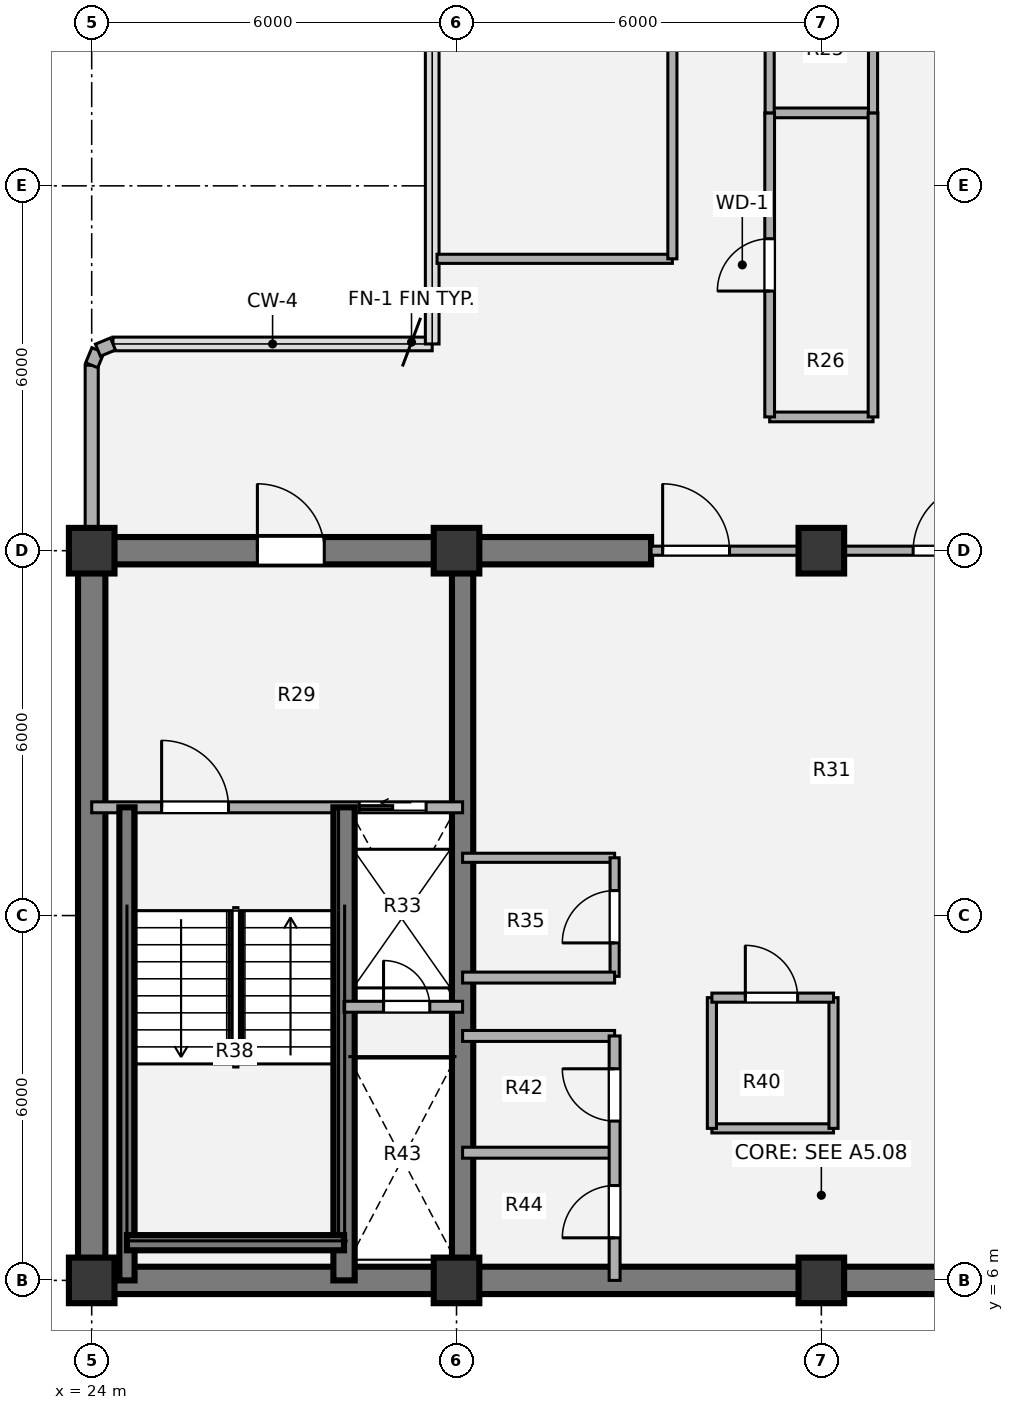
"""IFC4 building model, lengths in metres.
Left out: names, types, materials, properties, quantities, classifications, styles, units other than length and angle.
Written with IfcOpenShell. Run it as: python <this file> out.ifc"""

import sys

from ifc_helpers import new_model, si_unit, direction, frame, frame_2d, origin, origin_2d, place, context, subcontext, project, spatial, rectangle, extrude, source, transform, mapped, element, fill, save


model = new_model("IFC4")
c1 = context("Model", 3, precision=1e-05, world=origin(), true_north=direction((0.0, 1.0)))
c2 = subcontext(c1, "Body", "Model", "MODEL_VIEW")
j1 = project(units=[si_unit("LENGTHUNIT", "METRE"), si_unit("PLANEANGLEUNIT", "RADIAN")], contexts=[c1])
p1 = place(None, origin())
s1 = spatial("IfcSite", under=j1, at=p1, CompositionType="ELEMENT")
p2 = place(p1, origin())
s2 = spatial("IfcBuilding", under=s1, at=p2, CompositionType="ELEMENT")
p3 = place(p2, frame((0.0, 0.0, 167.76)))
s3 = spatial("IfcBuildingStorey", under=s2, at=p3, CompositionType="ELEMENT", Elevation=167.76)
m1 = source(origin(), c2, "Body", "SweptSolid", [
    extrude(rectangle(XDim=0.75, YDim=0.75, at=origin_2d()), origin(), (0.0, 0.0, 1.0), 3.78),
])
for number, where, z_axis, x_axis in (
    (1, (24.0, 6.0, 0.0), (0.0, 0.0, 1.0), (1.0, 0.0, 0.0)),
    (2, (30.0, 6.0, 0.0), (0.0, 0.0, 1.0), (1.0, 0.0, 0.0)),
    (3, (36.0, 6.0, 0.0), (0.0, 0.0, 1.0), (1.0, 0.0, 0.0)),
    (4, (24.0, 18.0, 0.0), (0.0, 0.0, 1.0), (1.0, 0.0, 0.0)),
    (5, (30.0, 18.0, 0.0), (0.0, 0.0, 1.0), (1.0, 0.0, 0.0)),
    (6, (36.0, 18.0, 0.0), (0.0, 0.0, 1.0), (1.0, 0.0, 0.0)),
):
    element("IfcColumn", number, at=place(p3, frame(where, z_axis=z_axis, x_axis=x_axis)), inside=s3, PredefinedType="COLUMN", context=c2, shape_type="MappedRepresentation", body=[
        mapped(m1, transform((0.0, 0.0, 0.0), x_axis=(1.0, 0.0, 0.0), y_axis=(0.0, 1.0, 0.0), z_axis=(0.0, 0.0, 1.0), scale=1.0)),
    ])
p4 = place(p3, frame((48.225, 6.0, 0.0), z_axis=(0.0, 0.0, 1.0), x_axis=(-1.0, 0.0, 0.0)))
e7 = element("IfcWall", 7, at=p4, inside=s3, PredefinedType="SHEAR", context=c2, shape_type="SweptSolid", body=[
    extrude(rectangle(XDim=24.45, YDim=0.45, at=frame_2d((12.225, 0.0))), origin(), (0.0, 0.0, 1.0), 3.78),
])
p5 = place(p3, frame((24.0, 6.0, 0.0), z_axis=(0.0, 0.0, 1.0), x_axis=(0.0, 1.0, 0.0)))
e8 = element("IfcWall", 8, at=p5, inside=s3, PredefinedType="SHEAR", context=c2, shape_type="SweptSolid", body=[
    extrude(rectangle(XDim=12.0, YDim=0.45, at=frame_2d((6.0, 0.0))), origin(), (0.0, 0.0, 1.0), 3.78),
])
p6 = place(p3, frame((23.775, 18.0, 0.0), z_axis=(0.0, 0.0, 1.0), x_axis=(1.0, 0.0, 0.0)))
e9 = element("IfcWall", 9, at=p6, inside=s3, PredefinedType="SHEAR", context=c2, shape_type="SweptSolid", body=[
    extrude(rectangle(XDim=9.425, YDim=0.45, at=frame_2d((4.712, 0.0))), origin(), (0.0, 0.0, 1.0), 3.78),
])
p7 = place(p6, frame((2.95, 0.0, 0.0)))
e10 = element("IfcOpeningElement", 10, at=p7, cuts=e9, PredefinedType="OPENING", context=c2, shape_type="SweptSolid", body=[
    extrude(rectangle(XDim=1.1, YDim=2.1, at=origin_2d()), frame((0.55, 0.235, 1.05), z_axis=(0.0, -1.0, 0.0), x_axis=(1.0, 0.0, 0.0)), (0.0, 0.0, 1.0), 0.47),
])
p8 = place(p3, frame((30.1, 6.0, 0.0), z_axis=(0.0, 0.0, 1.0), x_axis=(0.0, 1.0, 0.0)))
e11 = element("IfcWall", 11, at=p8, inside=s3, PredefinedType="SHEAR", context=c2, shape_type="SweptSolid", body=[
    extrude(rectangle(XDim=12.0, YDim=0.35, at=frame_2d((6.0, 0.0))), origin(), (0.0, 0.0, 1.0), 3.78),
])
p9 = place(p3, frame((24.0, 18.355, 0.0), z_axis=(0.0, 0.0, 1.0), x_axis=(0.0, 1.0, 0.0)))
e12 = element("IfcWall", 12, at=p9, inside=s3, PredefinedType="SOLIDWALL", context=c2, shape_type="SweptSolid", body=[
    extrude(rectangle(XDim=2.695, YDim=0.215, at=frame_2d((1.348, 0.0))), origin(), (0.0, 0.0, 1.0), 2.718),
])
p10 = place(p3, frame((24.0, 21.05, 0.0), z_axis=(0.0, 0.0, 1.0), x_axis=(0.382673670509, 0.923883575944, 0.0)))
e13 = element("IfcWall", 13, at=p10, inside=s3, PredefinedType="SOLIDWALL", context=c2, shape_type="SweptSolid", body=[
    extrude(rectangle(XDim=0.268, YDim=0.215, at=frame_2d((0.134, 0.0))), origin(), (0.0, 0.0, 1.0), 3.53),
])
p11 = place(p3, frame((24.103, 21.298, 0.0), z_axis=(0.0, 0.0, 1.0), x_axis=(0.924205486139, 0.381895560841, 0.0)))
e14 = element("IfcWall", 14, at=p11, inside=s3, PredefinedType="SOLIDWALL", context=c2, shape_type="SweptSolid", body=[
    extrude(rectangle(XDim=0.268, YDim=0.215, at=frame_2d((0.134, 0.0))), origin(), (0.0, 0.0, 1.0), 3.53),
])
p12 = place(p3, frame((30.1, 12.95, 0.0), z_axis=(0.0, 0.0, 1.0), x_axis=(1.0, 0.0, 0.0)))
e15 = element("IfcWall", 15, at=p12, inside=s3, PredefinedType="PARTITIONING", context=c2, shape_type="SweptSolid", body=[
    extrude(rectangle(XDim=2.5, YDim=0.15, at=frame_2d((1.25, 0.0))), origin(), (0.0, 0.0, 1.0), 3.5),
])
p13 = place(p3, frame((32.6, 11.0, 0.0), z_axis=(0.0, 0.0, 1.0), x_axis=(0.0, 1.0, 0.0)))
e16 = element("IfcWall", 16, at=p13, inside=s3, PredefinedType="PARTITIONING", context=c2, shape_type="SweptSolid", body=[
    extrude(rectangle(XDim=1.95, YDim=0.15, at=frame_2d((0.975, 0.0))), origin(), (0.0, 0.0, 1.0), 3.5),
])
p14 = place(p13, frame((0.55, 0.0, 0.0)))
e17 = element("IfcOpeningElement", 17, at=p14, cuts=e16, PredefinedType="OPENING", context=c2, shape_type="SweptSolid", body=[
    extrude(rectangle(XDim=0.86, YDim=2.1, at=origin_2d()), frame((0.43, 0.085, 1.05), z_axis=(0.0, -1.0, 0.0), x_axis=(1.0, 0.0, 0.0)), (0.0, 0.0, 1.0), 0.17),
])
p15 = place(p3, frame((34.2, 8.5, 0.0), z_axis=(0.0, 0.0, 1.0), x_axis=(1.0, 0.0, 0.0)))
e18 = element("IfcWall", 18, at=p15, inside=s3, PredefinedType="PARTITIONING", context=c2, shape_type="SweptSolid", body=[
    extrude(rectangle(XDim=2.0, YDim=0.15, at=frame_2d((1.0, 0.0))), origin(), (0.0, 0.0, 1.0), 3.5),
])
p16 = place(p3, frame((34.2, 8.5, 0.0), z_axis=(0.0, 0.0, 1.0), x_axis=(0.0, 1.0, 0.0)))
e19 = element("IfcWall", 19, at=p16, inside=s3, PredefinedType="PARTITIONING", context=c2, shape_type="SweptSolid", body=[
    extrude(rectangle(XDim=2.15, YDim=0.15, at=frame_2d((1.075, 0.0))), origin(), (0.0, 0.0, 1.0), 3.5),
])
p17 = place(p3, frame((36.2, 8.5, 0.0), z_axis=(0.0, 0.0, 1.0), x_axis=(0.0, 1.0, 0.0)))
e20 = element("IfcWall", 20, at=p17, inside=s3, PredefinedType="PARTITIONING", context=c2, shape_type="SweptSolid", body=[
    extrude(rectangle(XDim=2.15, YDim=0.15, at=frame_2d((1.075, 0.0))), origin(), (0.0, 0.0, 1.0), 2.715),
])
p18 = place(p3, frame((34.2, 10.65, 0.0), z_axis=(0.0, 0.0, 1.0), x_axis=(1.0, 0.0, 0.0)))
e21 = element("IfcWall", 21, at=p18, inside=s3, PredefinedType="PARTITIONING", context=c2, shape_type="SweptSolid", body=[
    extrude(rectangle(XDim=2.0, YDim=0.15, at=frame_2d((1.0, 0.0))), origin(), (0.0, 0.0, 1.0), 3.5),
])
p19 = place(p18, frame((0.55, 0.0, 0.0)))
e22 = element("IfcOpeningElement", 22, at=p19, cuts=e21, PredefinedType="OPENING", context=c2, shape_type="SweptSolid", body=[
    extrude(rectangle(XDim=0.86, YDim=2.1, at=origin_2d()), frame((0.43, 0.085, 1.05), z_axis=(0.0, -1.0, 0.0), x_axis=(1.0, 0.0, 0.0)), (0.0, 0.0, 1.0), 0.17),
])
for number, where, z_axis, x_axis in (
    (23, (30.1, 10.98, 0.0), (0.0, 0.0, 1.0), (1.0, 0.0, 0.0)),
    (24, (30.1, 8.1, 0.0), (0.0, 0.0, 1.0), (1.0, 0.0, 0.0)),
    (25, (30.1, 10.02, 0.0), (0.0, 0.0, 1.0), (1.0, 0.0, 0.0)),
):
    element("IfcWall", number, at=place(p3, frame(where, z_axis=z_axis, x_axis=x_axis)), inside=s3, PredefinedType="PARTITIONING", context=c2, shape_type="SweptSolid", body=[
        extrude(rectangle(XDim=2.5, YDim=0.18, at=frame_2d((1.25, 0.0))), origin(), (0.0, 0.0, 1.0), 3.5),
    ])
p20 = place(p3, frame((32.6, 6.0, 0.0), z_axis=(0.0, 0.0, 1.0), x_axis=(0.0, 1.0, 0.0)))
e26 = element("IfcWall", 26, at=p20, inside=s3, PredefinedType="PARTITIONING", context=c2, shape_type="SweptSolid", body=[
    extrude(rectangle(XDim=4.02, YDim=0.18, at=frame_2d((2.01, 0.0))), origin(), (0.0, 0.0, 1.0), 3.5),
])
p21 = place(p20, frame((0.7, 0.0, 0.0)))
e27 = element("IfcOpeningElement", 27, at=p21, cuts=e26, PredefinedType="OPENING", context=c2, shape_type="SweptSolid", body=[
    extrude(rectangle(XDim=0.86, YDim=2.1, at=origin_2d()), frame((0.43, 0.1, 1.05), z_axis=(0.0, -1.0, 0.0), x_axis=(1.0, 0.0, 0.0)), (0.0, 0.0, 1.0), 0.2),
])
p22 = place(p20, frame((2.62, 0.0, 0.0)))
e28 = element("IfcOpeningElement", 28, at=p22, cuts=e26, PredefinedType="OPENING", context=c2, shape_type="SweptSolid", body=[
    extrude(rectangle(XDim=0.86, YDim=2.1, at=origin_2d()), frame((0.43, 0.1, 1.05), z_axis=(0.0, -1.0, 0.0), x_axis=(1.0, 0.0, 0.0)), (0.0, 0.0, 1.0), 0.2),
])
p23 = place(p3, frame((33.2, 18.0, 0.0), z_axis=(0.0, 0.0, 1.0), x_axis=(1.0, 0.0, 0.0)))
e29 = element("IfcWall", 29, at=p23, inside=s3, PredefinedType="PARTITIONING", context=c2, shape_type="SweptSolid", body=[
    extrude(rectangle(XDim=5.6, YDim=0.15, at=frame_2d((2.8, 0.0))), origin(), (0.0, 0.0, 1.0), 2.515),
])
p24 = place(p23, frame((0.19, 0.0, 0.0)))
e30 = element("IfcOpeningElement", 30, at=p24, cuts=e29, PredefinedType="OPENING", context=c2, shape_type="SweptSolid", body=[
    extrude(rectangle(XDim=1.1, YDim=2.1, at=origin_2d()), frame((0.55, 0.085, 1.05), z_axis=(0.0, -1.0, 0.0), x_axis=(1.0, 0.0, 0.0)), (0.0, 0.0, 1.0), 0.17),
])
p25 = place(p23, frame((4.31, 0.0, 0.0)))
e31 = element("IfcOpeningElement", 31, at=p25, cuts=e29, PredefinedType="OPENING", context=c2, shape_type="SweptSolid", body=[
    extrude(rectangle(XDim=1.1, YDim=2.1, at=origin_2d()), frame((0.55, 0.085, 1.05), z_axis=(0.0, -1.0, 0.0), x_axis=(1.0, 0.0, 0.0)), (0.0, 0.0, 1.0), 0.17),
])
p26 = place(p3, frame((24.0, 13.78, 0.0), z_axis=(0.0, 0.0, 1.0), x_axis=(1.0, 0.0, 0.0)))
e32 = element("IfcWall", 32, at=p26, inside=s3, PredefinedType="PARTITIONING", context=c2, shape_type="SweptSolid", body=[
    extrude(rectangle(XDim=6.1, YDim=0.18, at=frame_2d((3.05, 0.0))), origin(), (0.0, 0.0, 1.0), 3.5),
])
p27 = place(p26, frame((1.15, 0.0, 0.0)))
e33 = element("IfcOpeningElement", 33, at=p27, cuts=e32, PredefinedType="OPENING", context=c2, shape_type="SweptSolid", body=[
    extrude(rectangle(XDim=1.1, YDim=2.1, at=origin_2d()), frame((0.55, 0.1, 1.05), z_axis=(0.0, -1.0, 0.0), x_axis=(1.0, 0.0, 0.0)), (0.0, 0.0, 1.0), 0.2),
])
p28 = place(p26, frame((4.4, 0.0, 0.0)))
e34 = element("IfcOpeningElement", 34, at=p28, cuts=e32, PredefinedType="OPENING", context=c2, shape_type="SweptSolid", body=[
    extrude(rectangle(XDim=1.1, YDim=2.1, at=origin_2d()), frame((0.55, 0.1, 1.05), z_axis=(0.0, -1.0, 0.0), x_axis=(1.0, 0.0, 0.0)), (0.0, 0.0, 1.0), 0.2),
])
p29 = place(p3, frame((28.15, 6.0, 0.0), z_axis=(0.0, 0.0, 1.0), x_axis=(0.0, 1.0, 0.0)))
e35 = element("IfcWall", 35, at=p29, inside=s3, PredefinedType="SHEAR", context=c2, shape_type="SweptSolid", body=[
    extrude(rectangle(XDim=7.78, YDim=0.35, at=frame_2d((3.89, 0.0))), origin(), (0.0, 0.0, 1.0), 3.85),
])
p30 = place(p3, frame((24.58, 6.0, 0.0), z_axis=(0.0, 0.0, 1.0), x_axis=(0.0, 1.0, 0.0)))
e36 = element("IfcWall", 36, at=p30, inside=s3, PredefinedType="SHEAR", context=c2, shape_type="SweptSolid", body=[
    extrude(rectangle(XDim=7.78, YDim=0.25, at=frame_2d((3.89, 0.0))), origin(), (0.0, 0.0, 1.0), 3.85),
])
p31 = place(p3, frame((24.58, 6.62, 0.0), z_axis=(0.0, 0.0, 1.0), x_axis=(1.0, 0.0, 0.0)))
e37 = element("IfcWall", 37, at=p31, inside=s3, PredefinedType="SHEAR", context=c2, shape_type="SweptSolid", body=[
    extrude(rectangle(XDim=3.57, YDim=0.25, at=frame_2d((1.785, 0.0))), origin(), (0.0, 0.0, 1.0), 3.85),
])
p32 = place(p3, frame((28.15, 10.5, 0.0), z_axis=(0.0, 0.0, 1.0), x_axis=(1.0, 0.0, 0.0)))
e38 = element("IfcWall", 38, at=p32, inside=s3, PredefinedType="PARTITIONING", context=c2, shape_type="SweptSolid", body=[
    extrude(rectangle(XDim=1.95, YDim=0.18, at=frame_2d((0.975, 0.0))), origin(), (0.0, 0.0, 1.0), 3.5),
])
p33 = place(p32, frame((0.65, 0.0, 0.0)))
e39 = element("IfcOpeningElement", 39, at=p33, cuts=e38, PredefinedType="OPENING", context=c2, shape_type="SweptSolid", body=[
    extrude(rectangle(XDim=0.76, YDim=2.05, at=origin_2d()), frame((0.38, 0.1, 1.025), z_axis=(0.0, -1.0, 0.0), x_axis=(1.0, 0.0, 0.0)), (0.0, 0.0, 1.0), 0.2),
])
p34 = place(p3, frame((35.15, 20.2, 0.0), z_axis=(0.0, 0.0, 1.0), x_axis=(1.0, 0.0, 0.0)))
e40 = element("IfcWall", 40, at=p34, inside=s3, PredefinedType="PLUMBINGWALL", context=c2, shape_type="SweptSolid", body=[
    extrude(rectangle(XDim=1.7, YDim=0.16, at=frame_2d((0.85, 0.0))), origin(), (0.0, 0.0, 1.0), 3.5),
])
p35 = place(p3, frame((29.68, 22.8, 0.0), z_axis=(0.0, 0.0, 1.0), x_axis=(1.0, 0.0, 0.0)))
e41 = element("IfcWall", 41, at=p35, inside=s3, PredefinedType="PARTITIONING", context=c2, shape_type="SweptSolid", body=[
    extrude(rectangle(XDim=3.87, YDim=0.15, at=frame_2d((1.935, 0.0))), origin(), (0.0, 0.0, 1.0), 3.5),
])
p36 = place(p3, frame((35.15, 25.2, 0.0), z_axis=(0.0, 0.0, 1.0), x_axis=(1.0, 0.0, 0.0)))
e42 = element("IfcWall", 42, at=p36, inside=s3, PredefinedType="PLUMBINGWALL", context=c2, shape_type="SweptSolid", body=[
    extrude(rectangle(XDim=1.7, YDim=0.16, at=frame_2d((0.85, 0.0))), origin(), (0.0, 0.0, 1.0), 3.5),
])
p37 = place(p3, frame((33.55, 22.8, 0.0), z_axis=(0.0, 0.0, 1.0), x_axis=(0.0, 1.0, 0.0)))
e43 = element("IfcWall", 43, at=p37, inside=s3, PredefinedType="PARTITIONING", context=c2, shape_type="SweptSolid", body=[
    extrude(rectangle(XDim=9.8, YDim=0.15, at=frame_2d((4.9, 0.0))), origin(), (0.0, 0.0, 1.0), 3.5),
])
p38 = place(p37, frame((4.34, 0.0, 0.0)))
e44 = element("IfcOpeningElement", 44, at=p38, cuts=e43, PredefinedType="OPENING", context=c2, shape_type="SweptSolid", body=[
    extrude(rectangle(XDim=0.86, YDim=2.1, at=origin_2d()), frame((0.43, 0.085, 1.05), z_axis=(0.0, -1.0, 0.0), x_axis=(1.0, 0.0, 0.0)), (0.0, 0.0, 1.0), 0.17),
])
p39 = place(p3, frame((35.15, 20.2, 0.0), z_axis=(0.0, 0.0, 1.0), x_axis=(0.0, 1.0, 0.0)))
e45 = element("IfcWall", 45, at=p39, inside=s3, PredefinedType="PLUMBINGWALL", context=c2, shape_type="SweptSolid", body=[
    extrude(rectangle(XDim=5.0, YDim=0.16, at=frame_2d((2.5, 0.0))), origin(), (0.0, 0.0, 1.0), 3.5),
])
p40 = place(p39, frame((2.07, 0.0, 0.0)))
e46 = element("IfcOpeningElement", 46, at=p40, cuts=e45, PredefinedType="OPENING", context=c2, shape_type="SweptSolid", body=[
    extrude(rectangle(XDim=0.86, YDim=2.1, at=origin_2d()), frame((0.43, 0.09, 1.05), z_axis=(0.0, -1.0, 0.0), x_axis=(1.0, 0.0, 0.0)), (0.0, 0.0, 1.0), 0.18),
])
p41 = place(p3, frame((35.15, 25.2, 0.0), z_axis=(0.0, 0.0, 1.0), x_axis=(0.0, 1.0, 0.0)))
e47 = element("IfcWall", 47, at=p41, inside=s3, PredefinedType="PARTITIONING", context=c2, shape_type="SweptSolid", body=[
    extrude(rectangle(XDim=15.46, YDim=0.15, at=frame_2d((7.73, 0.0))), origin(), (0.0, 0.0, 1.0), 3.5),
])
p42 = place(p3, frame((36.85, 20.2, 0.0), z_axis=(0.0, 0.0, 1.0), x_axis=(0.0, 1.0, 0.0)))
e48 = element("IfcWall", 48, at=p42, inside=s3, PredefinedType="PLUMBINGWALL", context=c2, shape_type="SweptSolid", body=[
    extrude(rectangle(XDim=5.0, YDim=0.16, at=frame_2d((2.5, 0.0))), origin(), (0.0, 0.0, 1.0), 3.5),
])
p43 = place(p3, frame((36.85, 25.2, 0.0), z_axis=(0.0, 0.0, 1.0), x_axis=(0.0, 1.0, 0.0)))
e49 = element("IfcWall", 49, at=p43, inside=s3, PredefinedType="PARTITIONING", context=c2, shape_type="SweptSolid", body=[
    extrude(rectangle(XDim=15.46, YDim=0.15, at=frame_2d((7.73, 0.0))), origin(), (0.0, 0.0, 1.0), 3.5),
])
p44 = place(p43, frame((7.205, 0.0, 0.0)))
e50 = element("IfcOpeningElement", 50, at=p44, cuts=e49, PredefinedType="OPENING", context=c2, shape_type="SweptSolid", body=[
    extrude(rectangle(XDim=1.05, YDim=2.1, at=origin_2d()), frame((0.525, 0.085, 1.05), z_axis=(0.0, -1.0, 0.0), x_axis=(1.0, 0.0, 0.0)), (0.0, 0.0, 1.0), 0.17),
])
m2 = source(origin(), c2, "Body", "SweptSolid", [
    extrude(rectangle(XDim=0.86, YDim=2.1, at=origin_2d()), frame((0.43, 0.025, 1.05), z_axis=(0.0, -1.0, 0.0), x_axis=(1.0, 0.0, 0.0)), (0.0, 0.0, 1.0), 0.05),
])
p45 = place(p14, origin())
e51 = element("IfcDoor", 51, at=p45, inside=s3, OperationType="SINGLE_SWING_LEFT", PredefinedType="DOOR", context=c2, shape_type="MappedRepresentation", body=[
    mapped(m2, transform((0.0, 0.0, 0.0), x_axis=(1.0, 0.0, 0.0), y_axis=(0.0, 1.0, 0.0), z_axis=(0.0, 0.0, 1.0), scale=1.0)),
])
fill(e17, e51)
p46 = place(p19, origin())
e52 = element("IfcDoor", 52, at=p46, inside=s3, OperationType="SINGLE_SWING_LEFT", PredefinedType="DOOR", context=c2, shape_type="MappedRepresentation", body=[
    mapped(m2, transform((0.0, 0.0, 0.0), x_axis=(1.0, 0.0, 0.0), y_axis=(0.0, 1.0, 0.0), z_axis=(0.0, 0.0, 1.0), scale=1.0)),
])
fill(e22, e52)
p47 = place(p21, origin())
e53 = element("IfcDoor", 53, at=p47, inside=s3, OperationType="SINGLE_SWING_LEFT", PredefinedType="DOOR", context=c2, shape_type="MappedRepresentation", body=[
    mapped(m2, transform((0.0, 0.0, 0.0), x_axis=(1.0, 0.0, 0.0), y_axis=(0.0, 1.0, 0.0), z_axis=(0.0, 0.0, 1.0), scale=1.0)),
])
fill(e27, e53)
p48 = place(p22, origin())
e54 = element("IfcDoor", 54, at=p48, inside=s3, OperationType="SINGLE_SWING_RIGHT", PredefinedType="DOOR", context=c2, shape_type="MappedRepresentation", body=[
    mapped(m2, transform((0.0, 0.0, 0.0), x_axis=(1.0, 0.0, 0.0), y_axis=(0.0, 1.0, 0.0), z_axis=(0.0, 0.0, 1.0), scale=1.0)),
])
fill(e28, e54)
m3 = source(origin(), c2, "Body", "SweptSolid", [
    extrude(rectangle(XDim=1.1, YDim=2.1, at=origin_2d()), frame((0.55, 0.025, 1.05), z_axis=(0.0, -1.0, 0.0), x_axis=(1.0, 0.0, 0.0)), (0.0, 0.0, 1.0), 0.05),
])
p49 = place(p24, origin())
e55 = element("IfcDoor", 55, at=p49, inside=s3, OperationType="SINGLE_SWING_LEFT", PredefinedType="DOOR", context=c2, shape_type="MappedRepresentation", body=[
    mapped(m3, transform((0.0, 0.0, 0.0), x_axis=(1.0, 0.0, 0.0), y_axis=(0.0, 1.0, 0.0), z_axis=(0.0, 0.0, 1.0), scale=1.0)),
])
fill(e30, e55)
p50 = place(p25, origin())
e56 = element("IfcDoor", 56, at=p50, inside=s3, OperationType="SINGLE_SWING_RIGHT", PredefinedType="DOOR", context=c2, shape_type="MappedRepresentation", body=[
    mapped(m3, transform((0.0, 0.0, 0.0), x_axis=(1.0, 0.0, 0.0), y_axis=(0.0, 1.0, 0.0), z_axis=(0.0, 0.0, 1.0), scale=1.0)),
])
fill(e31, e56)
m4 = source(origin(), c2, "Body", "SweptSolid", [
    extrude(rectangle(XDim=1.1, YDim=2.1, at=origin_2d()), frame((0.55, 0.025, 1.05), z_axis=(0.0, -1.0, 0.0), x_axis=(1.0, 0.0, 0.0)), (0.0, 0.0, 1.0), 0.05),
])
p51 = place(p27, origin())
e57 = element("IfcDoor", 57, at=p51, inside=s3, OperationType="SINGLE_SWING_LEFT", PredefinedType="DOOR", context=c2, shape_type="MappedRepresentation", body=[
    mapped(m4, transform((0.0, 0.0, 0.0), x_axis=(1.0, 0.0, 0.0), y_axis=(0.0, 1.0, 0.0), z_axis=(0.0, 0.0, 1.0), scale=1.0)),
])
fill(e33, e57)
m5 = source(origin(), c2, "Body", "SweptSolid", [
    extrude(rectangle(XDim=1.1, YDim=2.1, at=origin_2d()), frame((0.55, 0.025, 1.05), z_axis=(0.0, -1.0, 0.0), x_axis=(1.0, 0.0, 0.0)), (0.0, 0.0, 1.0), 0.05),
])
p52 = place(p28, origin())
e58 = element("IfcDoor", 58, at=p52, inside=s3, OperationType="SLIDING_TO_LEFT", PredefinedType="DOOR", context=c2, shape_type="MappedRepresentation", body=[
    mapped(m5, transform((0.0, 0.0, 0.0), x_axis=(1.0, 0.0, 0.0), y_axis=(0.0, 1.0, 0.0), z_axis=(0.0, 0.0, 1.0), scale=1.0)),
])
fill(e34, e58)
m6 = source(origin(), c2, "Body", "SweptSolid", [
    extrude(rectangle(XDim=0.76, YDim=2.05, at=origin_2d()), frame((0.38, 0.025, 1.025), z_axis=(0.0, -1.0, 0.0), x_axis=(1.0, 0.0, 0.0)), (0.0, 0.0, 1.0), 0.05),
])
p53 = place(p33, origin())
e59 = element("IfcDoor", 59, at=p53, inside=s3, OperationType="SINGLE_SWING_LEFT", PredefinedType="DOOR", context=c2, shape_type="MappedRepresentation", body=[
    mapped(m6, transform((0.0, 0.0, 0.0), x_axis=(1.0, 0.0, 0.0), y_axis=(0.0, 1.0, 0.0), z_axis=(0.0, 0.0, 1.0), scale=1.0)),
])
fill(e39, e59)
p54 = place(p7, origin())
e60 = element("IfcDoor", 60, at=p54, inside=s3, OperationType="SINGLE_SWING_LEFT", PredefinedType="DOOR", context=c2, shape_type="MappedRepresentation", body=[
    mapped(m3, transform((0.0, 0.0, 0.0), x_axis=(1.0, 0.0, 0.0), y_axis=(0.0, 1.0, 0.0), z_axis=(0.0, 0.0, 1.0), scale=1.0)),
])
fill(e10, e60)
m7 = source(origin(), c2, "Body", "SweptSolid", [
    extrude(rectangle(XDim=0.86, YDim=2.1, at=origin_2d()), frame((0.43, 0.025, 1.05), z_axis=(0.0, -1.0, 0.0), x_axis=(1.0, 0.0, 0.0)), (0.0, 0.0, 1.0), 0.05),
])
p55 = place(p40, origin())
e61 = element("IfcDoor", 61, at=p55, inside=s3, OperationType="SINGLE_SWING_LEFT", PredefinedType="DOOR", context=c2, shape_type="MappedRepresentation", body=[
    mapped(m7, transform((0.0, 0.0, 0.0), x_axis=(1.0, 0.0, 0.0), y_axis=(0.0, 1.0, 0.0), z_axis=(0.0, 0.0, 1.0), scale=1.0)),
])
fill(e46, e61)
save(model, sys.argv[1])
